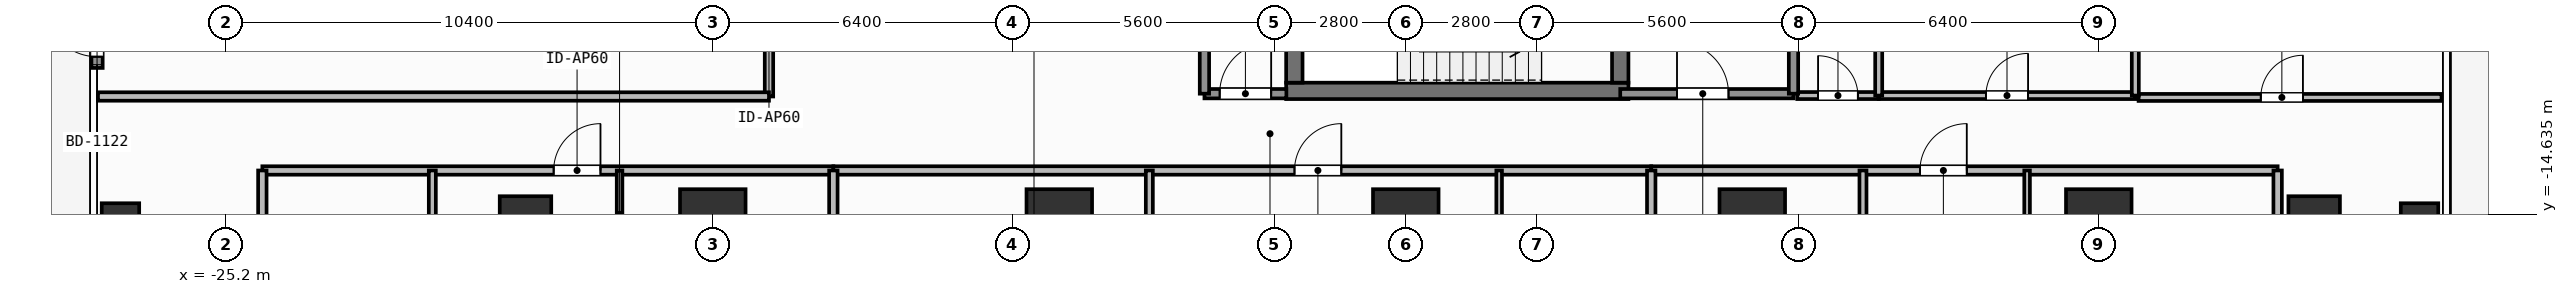
"""IFC4 building model, lengths in metres.
Left out: names, types, materials, properties, quantities, classifications, styles, units other than length and angle.
Written with IfcOpenShell. Run it as: python <this file> out.ifc"""

import sys

from ifc_helpers import new_model, si_unit, direction, frame, frame_2d, origin, origin_2d, place, context, subcontext, project, spatial, rectangle, hollow_rectangle, extrude, element, fill, save


model = new_model("IFC4")
c1 = context("Model", 3, precision=1e-05, world=origin(), true_north=direction((0.0, 1.0)))
c2 = subcontext(c1, "Body", "Model", "MODEL_VIEW")
j1 = project(units=[si_unit("LENGTHUNIT", "METRE"), si_unit("PLANEANGLEUNIT", "RADIAN")], contexts=[c1])
p1 = place(None, origin())
s1 = spatial("IfcSite", under=j1, at=p1, CompositionType="ELEMENT")
p2 = place(p1, origin())
s2 = spatial("IfcBuilding", under=s1, at=p2, CompositionType="ELEMENT")
p3 = place(p2, frame((0.0, 0.0, 54.0)))
s3 = spatial("IfcBuildingStorey", under=s2, at=p3, CompositionType="ELEMENT", Elevation=54.0)
p4 = place(p3, frame((-2.555, -12.0, 0.0), z_axis=(0.0, 0.0, 1.0), x_axis=(1.0, 0.0, 0.0)))
e1 = element("IfcWall", 1, at=p4, inside=s3, PredefinedType="SHEAR", context=c2, shape_type="SweptSolid", body=[
    extrude(rectangle(XDim=7.31, YDim=0.35, at=frame_2d((3.655, 0.0))), origin(), (0.0, 0.0, 1.0), 3.9),
])
p5 = place(p3, frame((-2.38, -11.825, 0.0), z_axis=(0.0, 0.0, 1.0), x_axis=(0.0, 1.0, 0.0)))
e2 = element("IfcWall", 2, at=p5, inside=s3, PredefinedType="SHEAR", context=c2, shape_type="SweptSolid", body=[
    extrude(rectangle(XDim=2.925, YDim=0.35, at=frame_2d((1.462, 0.0))), origin(), (0.0, 0.0, 1.0), 3.9),
])
p6 = place(p3, frame((4.58, -8.9, 0.0), z_axis=(0.0, 0.0, 1.0), x_axis=(0.0, -1.0, 0.0)))
e3 = element("IfcWall", 3, at=p6, inside=s3, PredefinedType="SHEAR", context=c2, shape_type="SweptSolid", body=[
    extrude(rectangle(XDim=2.925, YDim=0.35, at=frame_2d((1.462, 0.0))), origin(), (0.0, 0.0, 1.0), 3.9),
])
p7 = place(p6, frame((0.913, 0.0, 0.0)))
e4 = element("IfcOpeningElement", 4, at=p7, cuts=e3, PredefinedType="OPENING", context=c2, shape_type="SweptSolid", body=[
    extrude(rectangle(XDim=1.1, YDim=2.15, at=frame_2d((0.55, 1.075))), frame((0.0, 0.185, 0.0), z_axis=(0.0, -1.0, 0.0), x_axis=(1.0, 0.0, 0.0)), (0.0, 0.0, 1.0), 0.37),
])
for number, where, z_axis, x_axis in (
    (5, (-14.8, -14.8, 0.0), (0.0, 0.0, 1.0), (1.0, 0.0, 0.0)),
    (6, (-7.4, -14.8, 0.0), (0.0, 0.0, 1.0), (1.0, 0.0, 0.0)),
    (7, (0.0, -14.8, 0.0), (0.0, 0.0, 1.0), (1.0, 0.0, 0.0)),
    (8, (7.4, -14.8, 0.0), (0.0, 0.0, 1.0), (1.0, 0.0, 0.0)),
    (9, (14.8, -14.8, 0.0), (0.0, 0.0, 1.0), (1.0, 0.0, 0.0)),
):
    element("IfcColumn", number, at=place(p3, frame(where, z_axis=z_axis, x_axis=x_axis)), inside=s3, PredefinedType="COLUMN", context=c2, shape_type="SweptSolid", body=[
        extrude(rectangle(XDim=1.4, YDim=1.4, at=origin_2d()), origin(), (0.0, 0.0, 1.0), 3.9),
    ])
for number, where, z_axis, x_axis in (
    (10, (-18.8, -14.8, 0.0), (0.0, 0.0, 1.0), (1.0, 0.0, 0.0)),
    (11, (19.4, -14.8, 0.0), (0.0, 0.0, 1.0), (1.0, 0.0, 0.0)),
):
    element("IfcColumn", number, at=place(p3, frame(where, z_axis=z_axis, x_axis=x_axis)), inside=s3, PredefinedType="COLUMN", context=c2, shape_type="SweptSolid", body=[
        extrude(rectangle(XDim=1.1, YDim=1.1, at=origin_2d()), origin(), (0.0, 0.0, 1.0), 3.9),
    ])
for number, where, z_axis, x_axis in (
    (12, (-27.45, -14.8, 0.0), (0.0, 0.0, 1.0), (1.0, 0.0, 0.0)),
    (13, (21.65, -14.8, 0.0), (0.0, 0.0, 1.0), (1.0, 0.0, 0.0)),
):
    element("IfcColumn", number, at=place(p3, frame(where, z_axis=z_axis, x_axis=x_axis)), inside=s3, PredefinedType="COLUMN", context=c2, shape_type="SweptSolid", body=[
        extrude(hollow_rectangle(XDim=0.8, YDim=0.8, WallThickness=0.036, at=origin_2d()), origin(), (0.0, 0.0, 1.0), 3.9),
    ])
p8 = place(p3, frame((-27.95, -11.51, 0.0), z_axis=(0.0, 0.0, 1.0), x_axis=(0.0, 1.0, 0.0)))
e14 = element("IfcWall", 14, at=p8, inside=s3, PredefinedType="SOLIDWALL", context=c2, shape_type="SweptSolid", body=[
    extrude(rectangle(XDim=1.58, YDim=0.24, at=frame_2d((0.79, 0.0))), origin(), (0.0, 0.0, 1.0), 3.68),
])
p9 = place(p8, frame((0.24, 0.0, 0.0)))
e15 = element("IfcOpeningElement", 15, at=p9, cuts=e14, PredefinedType="OPENING", context=c2, shape_type="SweptSolid", body=[
    extrude(rectangle(XDim=1.1, YDim=2.2, at=frame_2d((0.55, 1.1))), frame((0.0, 0.13, 0.0), z_axis=(0.0, -1.0, 0.0), x_axis=(1.0, 0.0, 0.0)), (0.0, 0.0, 1.0), 0.26),
])
p10 = place(p3, frame((4.58, -12.06, 0.0), z_axis=(0.0, 0.0, 1.0), x_axis=(1.0, 0.0, 0.0)))
e16 = element("IfcWall", 16, at=p10, inside=s3, PredefinedType="SOLIDWALL", context=c2, shape_type="SweptSolid", body=[
    extrude(rectangle(XDim=3.7, YDim=0.2, at=frame_2d((1.85, 0.0))), origin(), (0.0, 0.0, 1.0), 3.68),
])
p11 = place(p10, frame((1.212, 0.0, 0.0)))
e17 = element("IfcOpeningElement", 17, at=p11, cuts=e16, PredefinedType="OPENING", context=c2, shape_type="SweptSolid", body=[
    extrude(rectangle(XDim=1.1, YDim=2.15, at=frame_2d((0.55, 1.075))), frame((0.0, 0.11, 0.0), z_axis=(0.0, -1.0, 0.0), x_axis=(1.0, 0.0, 0.0)), (0.0, 0.0, 1.0), 0.22),
])
p12 = place(p3, frame((-4.3, -12.06, 0.0), z_axis=(0.0, 0.0, 1.0), x_axis=(1.0, 0.0, 0.0)))
e18 = element("IfcWall", 18, at=p12, inside=s3, PredefinedType="SOLIDWALL", context=c2, shape_type="SweptSolid", body=[
    extrude(rectangle(XDim=1.75, YDim=0.2, at=frame_2d((0.875, 0.0))), origin(), (0.0, 0.0, 1.0), 3.68),
])
p13 = place(p12, frame((0.325, 0.0, 0.0)))
e19 = element("IfcOpeningElement", 19, at=p13, cuts=e18, PredefinedType="OPENING", context=c2, shape_type="SweptSolid", body=[
    extrude(rectangle(XDim=1.1, YDim=2.15, at=frame_2d((0.55, 1.075))), frame((0.0, 0.11, 0.0), z_axis=(0.0, -1.0, 0.0), x_axis=(1.0, 0.0, 0.0)), (0.0, 0.0, 1.0), 0.22),
])
p14 = place(p3, frame((8.36, -12.1, 0.0), z_axis=(0.0, 0.0, 1.0), x_axis=(1.0, 0.0, 0.0)))
e20 = element("IfcWall", 20, at=p14, inside=s3, PredefinedType="PARTITIONING", context=c2, shape_type="SweptSolid", body=[
    extrude(rectangle(XDim=1.74, YDim=0.15, at=frame_2d((0.87, 0.0))), origin(), (0.0, 0.0, 1.0), 3.68),
])
p15 = place(p14, frame((0.445, 0.0, 0.0)))
e21 = element("IfcOpeningElement", 21, at=p15, cuts=e20, PredefinedType="OPENING", context=c2, shape_type="SweptSolid", body=[
    extrude(rectangle(XDim=0.85, YDim=2.1, at=frame_2d((0.425, 1.05))), frame((0.0, 0.085, 0.0), z_axis=(0.0, -1.0, 0.0), x_axis=(1.0, 0.0, 0.0)), (0.0, 0.0, 1.0), 0.17),
])
p16 = place(p3, frame((10.1, -12.1, 0.0), z_axis=(0.0, 0.0, 1.0), x_axis=(1.0, 0.0, 0.0)))
e22 = element("IfcWall", 22, at=p16, inside=s3, PredefinedType="PARTITIONING", context=c2, shape_type="SweptSolid", body=[
    extrude(rectangle(XDim=5.48, YDim=0.15, at=frame_2d((2.74, 0.0))), origin(), (0.0, 0.0, 1.0), 3.68),
])
p17 = place(p16, frame((2.29, 0.0, 0.0)))
e23 = element("IfcOpeningElement", 23, at=p17, cuts=e22, PredefinedType="OPENING", context=c2, shape_type="SweptSolid", body=[
    extrude(rectangle(XDim=0.9, YDim=2.1, at=frame_2d((0.45, 1.05))), frame((0.0, 0.085, 0.0), z_axis=(0.0, -1.0, 0.0), x_axis=(1.0, 0.0, 0.0)), (0.0, 0.0, 1.0), 0.17),
])
p18 = place(p3, frame((-24.42, -13.7, 0.0), z_axis=(0.0, 0.0, 1.0), x_axis=(1.0, 0.0, 0.0)))
e24 = element("IfcWall", 24, at=p18, inside=s3, PredefinedType="PARTITIONING", context=c2, shape_type="SweptSolid", body=[
    extrude(rectangle(XDim=12.195, YDim=0.18, at=frame_2d((6.097, 0.0))), origin(), (0.0, 0.0, 1.0), 3.68),
])
p19 = place(p18, frame((6.221, 0.0, 0.0)))
e25 = element("IfcOpeningElement", 25, at=p19, cuts=e24, PredefinedType="OPENING", context=c2, shape_type="SweptSolid", body=[
    extrude(rectangle(XDim=1.0, YDim=2.2, at=frame_2d((0.5, 1.1))), frame((0.0, 0.1, 0.0), z_axis=(0.0, -1.0, 0.0), x_axis=(1.0, 0.0, 0.0)), (0.0, 0.0, 1.0), 0.2),
])
p20 = place(p3, frame((-20.79, -20.79, 0.0), z_axis=(0.0, 0.0, 1.0), x_axis=(0.0, 1.0, 0.0)))
e26 = element("IfcWall", 26, at=p20, inside=s3, PredefinedType="PARTITIONING", context=c2, shape_type="SweptSolid", body=[
    extrude(rectangle(XDim=7.09, YDim=0.15, at=frame_2d((3.545, 0.0))), origin(), (0.0, 0.0, 1.0), 3.68),
])
p21 = place(p20, frame((3.03, 0.0, 0.0)))
e27 = element("IfcOpeningElement", 27, at=p21, cuts=e26, PredefinedType="OPENING", context=c2, shape_type="SweptSolid", body=[
    extrude(rectangle(XDim=0.85, YDim=2.1, at=frame_2d((0.425, 1.05))), frame((0.0, 0.085, 0.0), z_axis=(0.0, -1.0, 0.0), x_axis=(1.0, 0.0, 0.0)), (0.0, 0.0, 1.0), 0.17),
])
p22 = place(p3, frame((-16.791, -17.1, 0.0), z_axis=(0.0, 0.0, 1.0), x_axis=(0.0, 1.0, 0.0)))
e28 = element("IfcWall", 28, at=p22, inside=s3, PredefinedType="PARTITIONING", context=c2, shape_type="SweptSolid", body=[
    extrude(rectangle(XDim=3.4, YDim=0.12, at=frame_2d((1.7, 0.0))), origin(), (0.0, 0.0, 1.0), 3.68),
])
p23 = place(p22, frame((0.675, 0.0, 0.0)))
e29 = element("IfcOpeningElement", 29, at=p23, cuts=e28, PredefinedType="OPENING", context=c2, shape_type="SweptSolid", body=[
    extrude(rectangle(XDim=0.85, YDim=2.1, at=frame_2d((0.425, 1.05))), frame((0.0, 0.07, 0.0), z_axis=(0.0, -1.0, 0.0), x_axis=(1.0, 0.0, 0.0)), (0.0, 0.0, 1.0), 0.14),
])
p24 = place(p3, frame((-12.225, -13.7, 0.0), z_axis=(0.0, 0.0, 1.0), x_axis=(1.0, 0.0, 0.0)))
e30 = element("IfcWall", 30, at=p24, inside=s3, PredefinedType="PARTITIONING", context=c2, shape_type="SweptSolid", body=[
    extrude(rectangle(XDim=17.467, YDim=0.18, at=frame_2d((8.733, 0.0))), origin(), (0.0, 0.0, 1.0), 3.68),
])
p25 = place(p24, frame((9.848, 0.0, 0.0)))
e31 = element("IfcOpeningElement", 31, at=p25, cuts=e30, PredefinedType="OPENING", context=c2, shape_type="SweptSolid", body=[
    extrude(rectangle(XDim=1.0, YDim=2.2, at=frame_2d((0.5, 1.1))), frame((0.0, 0.1, 0.0), z_axis=(0.0, -1.0, 0.0), x_axis=(1.0, 0.0, 0.0)), (0.0, 0.0, 1.0), 0.2),
])
p26 = place(p3, frame((-5.477, -16.678, 0.0), z_axis=(0.0, 0.0, 1.0), x_axis=(0.0, 1.0, 0.0)))
e32 = element("IfcWall", 32, at=p26, inside=s3, PredefinedType="PARTITIONING", context=c2, shape_type="SweptSolid", body=[
    extrude(rectangle(XDim=2.978, YDim=0.15, at=frame_2d((1.489, 0.0))), origin(), (0.0, 0.0, 1.0), 3.68),
])
p27 = place(p3, frame((1.994, -18.096, 0.0), z_axis=(0.0, 0.0, 1.0), x_axis=(0.0, 1.0, 0.0)))
e33 = element("IfcWall", 33, at=p27, inside=s3, PredefinedType="PARTITIONING", context=c2, shape_type="SweptSolid", body=[
    extrude(rectangle(XDim=4.396, YDim=0.12, at=frame_2d((2.198, 0.0))), origin(), (0.0, 0.0, 1.0), 3.68),
])
p28 = place(p27, frame((1.594, 0.0, 0.0)))
e34 = element("IfcOpeningElement", 34, at=p28, cuts=e33, PredefinedType="OPENING", context=c2, shape_type="SweptSolid", body=[
    extrude(rectangle(XDim=0.85, YDim=2.1, at=frame_2d((0.425, 1.05))), frame((0.0, 0.07, 0.0), z_axis=(0.0, -1.0, 0.0), x_axis=(1.0, 0.0, 0.0)), (0.0, 0.0, 1.0), 0.14),
])
p29 = place(p3, frame((5.242, -13.7, 0.0), z_axis=(0.0, 0.0, 1.0), x_axis=(1.0, 0.0, 0.0)))
e35 = element("IfcWall", 35, at=p29, inside=s3, PredefinedType="PARTITIONING", context=c2, shape_type="SweptSolid", body=[
    extrude(rectangle(XDim=13.378, YDim=0.18, at=frame_2d((6.689, 0.0))), origin(), (0.0, 0.0, 1.0), 3.68),
])
p30 = place(p29, frame((5.739, 0.0, 0.0)))
e36 = element("IfcOpeningElement", 36, at=p30, cuts=e35, PredefinedType="OPENING", context=c2, shape_type="SweptSolid", body=[
    extrude(rectangle(XDim=1.0, YDim=2.2, at=frame_2d((0.5, 1.1))), frame((0.0, 0.1, 0.0), z_axis=(0.0, -1.0, 0.0), x_axis=(1.0, 0.0, 0.0)), (0.0, 0.0, 1.0), 0.2),
])
p31 = place(p3, frame((9.764, -20.79, 0.0), z_axis=(0.0, 0.0, 1.0), x_axis=(0.0, 1.0, 0.0)))
e37 = element("IfcWall", 37, at=p31, inside=s3, PredefinedType="PARTITIONING", context=c2, shape_type="SweptSolid", body=[
    extrude(rectangle(XDim=7.09, YDim=0.15, at=frame_2d((3.545, 0.0))), origin(), (0.0, 0.0, 1.0), 3.68),
])
p32 = place(p31, frame((3.03, 0.0, 0.0)))
e38 = element("IfcOpeningElement", 38, at=p32, cuts=e37, PredefinedType="OPENING", context=c2, shape_type="SweptSolid", body=[
    extrude(rectangle(XDim=0.85, YDim=2.1, at=frame_2d((0.425, 1.05))), frame((0.0, 0.085, 0.0), z_axis=(0.0, -1.0, 0.0), x_axis=(1.0, 0.0, 0.0)), (0.0, 0.0, 1.0), 0.17),
])
p33 = place(p3, frame((13.269, -18.663, 0.0), z_axis=(0.0, 0.0, 1.0), x_axis=(0.0, 1.0, 0.0)))
e39 = element("IfcWall", 39, at=p33, inside=s3, PredefinedType="PARTITIONING", context=c2, shape_type="SweptSolid", body=[
    extrude(rectangle(XDim=4.963, YDim=0.12, at=frame_2d((2.481, 0.0))), origin(), (0.0, 0.0, 1.0), 3.68),
])
p34 = place(p33, frame((2.229, 0.0, 0.0)))
e40 = element("IfcOpeningElement", 40, at=p34, cuts=e39, PredefinedType="OPENING", context=c2, shape_type="SweptSolid", body=[
    extrude(rectangle(XDim=0.85, YDim=2.1, at=frame_2d((0.425, 1.05))), frame((0.0, 0.07, 0.0), z_axis=(0.0, -1.0, 0.0), x_axis=(1.0, 0.0, 0.0)), (0.0, 0.0, 1.0), 0.14),
])
p35 = place(p3, frame((-13.6, -12.12, 0.0), z_axis=(0.0, 0.0, 1.0), x_axis=(0.0, 1.0, 0.0)))
e41 = element("IfcWall", 41, at=p35, inside=s3, PredefinedType="PARTITIONING", context=c2, shape_type="SweptSolid", body=[
    extrude(rectangle(XDim=9.389, YDim=0.18, at=frame_2d((4.695, 0.0))), origin(), (0.0, 0.0, 1.0), 3.68),
])
p36 = place(p35, frame((1.415, 0.0, 0.0)))
e42 = element("IfcOpeningElement", 42, at=p36, cuts=e41, PredefinedType="OPENING", context=c2, shape_type="SweptSolid", body=[
    extrude(rectangle(XDim=1.0, YDim=2.2, at=frame_2d((0.5, 1.1))), frame((0.0, 0.1, 0.0), z_axis=(0.0, -1.0, 0.0), x_axis=(1.0, 0.0, 0.0)), (0.0, 0.0, 1.0), 0.2),
])
p37 = place(p3, frame((15.65, -12.14, 0.0), z_axis=(0.0, 0.0, 1.0), x_axis=(1.0, 0.0, 0.0)))
e43 = element("IfcWall", 43, at=p37, inside=s3, PredefinedType="PARTITIONING", context=c2, shape_type="SweptSolid", body=[
    extrude(rectangle(XDim=6.47, YDim=0.15, at=frame_2d((3.235, 0.0))), origin(), (0.0, 0.0, 1.0), 3.68),
])
p38 = place(p37, frame((2.61, 0.0, 0.0)))
e44 = element("IfcOpeningElement", 44, at=p38, cuts=e43, PredefinedType="OPENING", context=c2, shape_type="SweptSolid", body=[
    extrude(rectangle(XDim=0.9, YDim=2.1, at=frame_2d((0.45, 1.05))), frame((0.0, 0.085, 0.0), z_axis=(0.0, -1.0, 0.0), x_axis=(1.0, 0.0, 0.0)), (0.0, 0.0, 1.0), 0.17),
])
for number, where, z_axis, x_axis in (
    (45, (8.28, -12.06, 0.0), (0.0, 0.0, 1.0), (0.0, 1.0, 0.0)),
    (46, (-4.3, -12.06, 0.0), (0.0, 0.0, 1.0), (0.0, 1.0, 0.0)),
):
    element("IfcWall", number, at=place(p3, frame(where, z_axis=z_axis, x_axis=x_axis)), inside=s3, PredefinedType="SOLIDWALL", context=c2, shape_type="SweptSolid", body=[
        extrude(rectangle(XDim=3.11, YDim=0.2, at=frame_2d((1.555, 0.0))), origin(), (0.0, 0.0, 1.0), 3.68),
    ])
p39 = place(p3, frame((10.1, -12.1, 0.0), z_axis=(0.0, 0.0, 1.0), x_axis=(0.0, 1.0, 0.0)))
e47 = element("IfcWall", 47, at=p39, inside=s3, PredefinedType="PARTITIONING", context=c2, shape_type="SweptSolid", body=[
    extrude(rectangle(XDim=2.35, YDim=0.15, at=frame_2d((1.175, 0.0))), origin(), (0.0, 0.0, 1.0), 3.68),
])
p40 = place(p3, frame((15.58, -12.1, 0.0), z_axis=(0.0, 0.0, 1.0), x_axis=(0.0, 1.0, 0.0)))
e48 = element("IfcWall", 48, at=p40, inside=s3, PredefinedType="PARTITIONING", context=c2, shape_type="SweptSolid", body=[
    extrude(rectangle(XDim=6.25, YDim=0.15, at=frame_2d((3.125, 0.0))), origin(), (0.0, 0.0, 1.0), 3.68),
])
for number, where, z_axis, x_axis in (
    (49, (-24.42, -23.91, 0.0), (0.0, 0.0, 1.0), (0.0, 1.0, 0.0)),
    (50, (18.62, -23.91, 0.0), (0.0, 0.0, 1.0), (0.0, 1.0, 0.0)),
):
    element("IfcWall", number, at=place(p3, frame(where, z_axis=z_axis, x_axis=x_axis)), inside=s3, PredefinedType="PARTITIONING", context=c2, shape_type="SweptSolid", body=[
        extrude(rectangle(XDim=10.21, YDim=0.18, at=frame_2d((5.105, 0.0))), origin(), (0.0, 0.0, 1.0), 3.68),
    ])
for number, where, z_axis, x_axis in (
    (51, (-12.225, -25.03, 0.0), (0.0, 0.0, 1.0), (0.0, 1.0, 0.0)),
    (52, (5.242, -25.03, 0.0), (0.0, 0.0, 1.0), (0.0, 1.0, 0.0)),
):
    element("IfcWall", number, at=place(p3, frame(where, z_axis=z_axis, x_axis=x_axis)), inside=s3, PredefinedType="PARTITIONING", context=c2, shape_type="SweptSolid", body=[
        extrude(rectangle(XDim=11.33, YDim=0.18, at=frame_2d((5.665, 0.0))), origin(), (0.0, 0.0, 1.0), 3.68),
    ])
p41 = place(p3, frame((-27.93, -12.12, 0.0), z_axis=(0.0, 0.0, 1.0), x_axis=(1.0, 0.0, 0.0)))
e53 = element("IfcWall", 53, at=p41, inside=s3, PredefinedType="PARTITIONING", context=c2, shape_type="SweptSolid", body=[
    extrude(rectangle(XDim=14.33, YDim=0.18, at=frame_2d((7.165, 0.0))), origin(), (0.0, 0.0, 1.0), 3.68),
])
p42 = place(p9, origin())
e54 = element("IfcDoor", 54, at=p42, inside=s3, OperationType="SINGLE_SWING_RIGHT", PredefinedType="DOOR", context=c2, shape_type="SweptSolid", body=[
    extrude(rectangle(XDim=1.1, YDim=2.2, at=frame_2d((0.55, 1.1))), frame((0.0, 0.025, 0.0), z_axis=(0.0, -1.0, 0.0), x_axis=(1.0, 0.0, 0.0)), (0.0, 0.0, 1.0), 0.05),
])
fill(e15, e54)
p43 = place(p11, origin())
e55 = element("IfcDoor", 55, at=p43, inside=s3, OperationType="SINGLE_SWING_LEFT", PredefinedType="DOOR", context=c2, shape_type="SweptSolid", body=[
    extrude(rectangle(XDim=1.1, YDim=2.15, at=frame_2d((0.55, 1.075))), frame((0.0, 0.025, 0.0), z_axis=(0.0, -1.0, 0.0), x_axis=(1.0, 0.0, 0.0)), (0.0, 0.0, 1.0), 0.05),
])
fill(e17, e55)
p44 = place(p13, origin())
e56 = element("IfcDoor", 56, at=p44, inside=s3, OperationType="SINGLE_SWING_RIGHT", PredefinedType="DOOR", context=c2, shape_type="SweptSolid", body=[
    extrude(rectangle(XDim=1.1, YDim=2.15, at=frame_2d((0.55, 1.075))), frame((0.0, 0.025, 0.0), z_axis=(0.0, -1.0, 0.0), x_axis=(1.0, 0.0, 0.0)), (0.0, 0.0, 1.0), 0.05),
])
fill(e19, e56)
p45 = place(p15, origin())
e57 = element("IfcDoor", 57, at=p45, inside=s3, OperationType="SINGLE_SWING_LEFT", PredefinedType="DOOR", context=c2, shape_type="SweptSolid", body=[
    extrude(rectangle(XDim=0.85, YDim=2.1, at=frame_2d((0.425, 1.05))), frame((0.0, 0.025, 0.0), z_axis=(0.0, -1.0, 0.0), x_axis=(1.0, 0.0, 0.0)), (0.0, 0.0, 1.0), 0.05),
])
fill(e21, e57)
p46 = place(p17, origin())
e58 = element("IfcDoor", 58, at=p46, inside=s3, OperationType="SINGLE_SWING_RIGHT", PredefinedType="DOOR", context=c2, shape_type="SweptSolid", body=[
    extrude(rectangle(XDim=0.9, YDim=2.1, at=frame_2d((0.45, 1.05))), frame((0.0, 0.025, 0.0), z_axis=(0.0, -1.0, 0.0), x_axis=(1.0, 0.0, 0.0)), (0.0, 0.0, 1.0), 0.05),
])
fill(e23, e58)
p47 = place(p19, origin())
e59 = element("IfcDoor", 59, at=p47, inside=s3, OperationType="SINGLE_SWING_RIGHT", PredefinedType="DOOR", context=c2, shape_type="SweptSolid", body=[
    extrude(rectangle(XDim=1.0, YDim=2.2, at=frame_2d((0.5, 1.1))), frame((0.0, 0.025, 0.0), z_axis=(0.0, -1.0, 0.0), x_axis=(1.0, 0.0, 0.0)), (0.0, 0.0, 1.0), 0.05),
])
fill(e25, e59)
p48 = place(p25, origin())
e60 = element("IfcDoor", 60, at=p48, inside=s3, OperationType="SINGLE_SWING_RIGHT", PredefinedType="DOOR", context=c2, shape_type="SweptSolid", body=[
    extrude(rectangle(XDim=1.0, YDim=2.2, at=frame_2d((0.5, 1.1))), frame((0.0, 0.025, 0.0), z_axis=(0.0, -1.0, 0.0), x_axis=(1.0, 0.0, 0.0)), (0.0, 0.0, 1.0), 0.05),
])
fill(e31, e60)
p49 = place(p30, origin())
e61 = element("IfcDoor", 61, at=p49, inside=s3, OperationType="SINGLE_SWING_RIGHT", PredefinedType="DOOR", context=c2, shape_type="SweptSolid", body=[
    extrude(rectangle(XDim=1.0, YDim=2.2, at=frame_2d((0.5, 1.1))), frame((0.0, 0.025, 0.0), z_axis=(0.0, -1.0, 0.0), x_axis=(1.0, 0.0, 0.0)), (0.0, 0.0, 1.0), 0.05),
])
fill(e36, e61)
p50 = place(p38, origin())
e62 = element("IfcDoor", 62, at=p50, inside=s3, OperationType="SINGLE_SWING_RIGHT", PredefinedType="DOOR", context=c2, shape_type="SweptSolid", body=[
    extrude(rectangle(XDim=0.9, YDim=2.1, at=frame_2d((0.45, 1.05))), frame((0.0, 0.025, 0.0), z_axis=(0.0, -1.0, 0.0), x_axis=(1.0, 0.0, 0.0)), (0.0, 0.0, 1.0), 0.05),
])
fill(e44, e62)
save(model, sys.argv[1])
